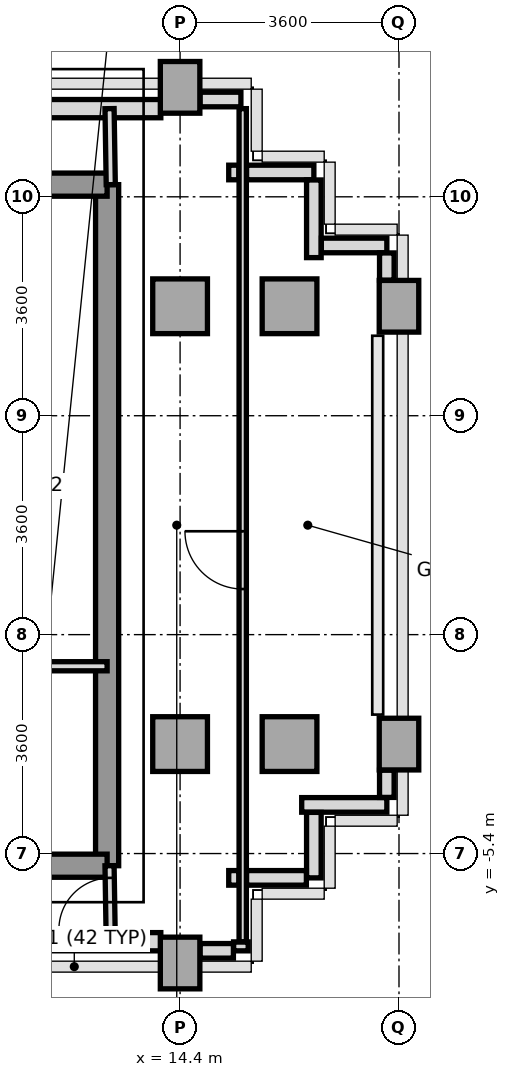
"""IFC4 building model, lengths in metres.
Left out: names, types, materials, properties, quantities, classifications, styles, units other than length and angle.
Written with IfcOpenShell. Run it as: python <this file> out.ifc"""

import sys

from ifc_helpers import new_model, si_unit, direction, frame, frame_2d, origin, origin_2d, place, context, subcontext, project, spatial, rectangle, extrude, source, transform, mapped, element, fill, save


model = new_model("IFC4")
c1 = context("Model", 3, precision=1e-05, world=origin(), true_north=direction((0.0, 1.0)))
c2 = subcontext(c1, "Body", "Model", "MODEL_VIEW")
j1 = project(units=[si_unit("LENGTHUNIT", "METRE"), si_unit("PLANEANGLEUNIT", "RADIAN")], contexts=[c1])
p1 = place(None, origin())
s1 = spatial("IfcSite", under=j1, at=p1, CompositionType="ELEMENT")
p2 = place(p1, origin())
s2 = spatial("IfcBuilding", under=s1, at=p2, CompositionType="ELEMENT")
p3 = place(p2, frame((0.0, 0.0, 160.4)))
s3 = spatial("IfcBuildingStorey", under=s2, at=p3, CompositionType="ELEMENT", Elevation=160.4)
m1 = source(origin(), c2, "Body", "SweptSolid", [
    extrude(rectangle(XDim=0.65, YDim=0.85, at=origin_2d()), origin(), (0.0, 0.0, 1.0), 3.2),
])
p4 = place(p3, frame((14.4, -7.2, 0.0), z_axis=(0.0, 0.0, 1.0), x_axis=(1.0, 0.0, 0.0)))
e1 = element("IfcColumn", 1, at=p4, inside=s3, PredefinedType="COLUMN", context=c2, shape_type="MappedRepresentation", body=[
    mapped(m1, transform((0.0, 0.0, 0.0), x_axis=(1.0, 0.0, 0.0), y_axis=(0.0, 1.0, 0.0), z_axis=(0.0, 0.0, 1.0), scale=1.0)),
])
m2 = source(origin(), c2, "Body", "SweptSolid", [
    extrude(rectangle(XDim=0.9, YDim=0.9, at=origin_2d()), origin(), (0.0, 0.0, 1.0), 3.2),
])
for number, where, z_axis, x_axis in (
    (2, (14.4, -3.6, 0.0), (0.0, 0.0, 1.0), (1.0, 0.0, 0.0)),
    (3, (14.4, 3.6, 0.0), (0.0, 0.0, 1.0), (1.0, 0.0, 0.0)),
):
    element("IfcColumn", number, at=place(p3, frame(where, z_axis=z_axis, x_axis=x_axis)), inside=s3, PredefinedType="COLUMN", context=c2, shape_type="MappedRepresentation", body=[
        mapped(m2, transform((0.0, 0.0, 0.0), x_axis=(1.0, 0.0, 0.0), y_axis=(0.0, 1.0, 0.0), z_axis=(0.0, 0.0, 1.0), scale=1.0)),
    ])
p5 = place(p3, frame((14.4, 7.2, 0.0), z_axis=(0.0, 0.0, 1.0), x_axis=(1.0, 0.0, 0.0)))
e4 = element("IfcColumn", 4, at=p5, inside=s3, PredefinedType="COLUMN", context=c2, shape_type="MappedRepresentation", body=[
    mapped(m1, transform((0.0, 0.0, 0.0), x_axis=(1.0, 0.0, 0.0), y_axis=(0.0, 1.0, 0.0), z_axis=(0.0, 0.0, 1.0), scale=1.0)),
])
for number, where, z_axis, x_axis in (
    (5, (16.2, -3.6, 0.0), (0.0, 0.0, 1.0), (1.0, 0.0, 0.0)),
    (6, (16.2, 3.6, 0.0), (0.0, 0.0, 1.0), (1.0, 0.0, 0.0)),
):
    element("IfcColumn", number, at=place(p3, frame(where, z_axis=z_axis, x_axis=x_axis)), inside=s3, PredefinedType="COLUMN", context=c2, shape_type="MappedRepresentation", body=[
        mapped(m2, transform((0.0, 0.0, 0.0), x_axis=(1.0, 0.0, 0.0), y_axis=(0.0, 1.0, 0.0), z_axis=(0.0, 0.0, 1.0), scale=1.0)),
    ])
for number, where, z_axis, x_axis in (
    (7, (18.0, -3.6, 0.0), (0.0, 0.0, 1.0), (1.0, 0.0, 0.0)),
    (8, (18.0, 3.6, 0.0), (0.0, 0.0, 1.0), (1.0, 0.0, 0.0)),
):
    element("IfcColumn", number, at=place(p3, frame(where, z_axis=z_axis, x_axis=x_axis)), inside=s3, PredefinedType="COLUMN", context=c2, shape_type="MappedRepresentation", body=[
        mapped(m1, transform((0.0, 0.0, 0.0), x_axis=(1.0, 0.0, 0.0), y_axis=(0.0, 1.0, 0.0), z_axis=(0.0, 0.0, 1.0), scale=1.0)),
    ])
p6 = place(p3, frame((11.448, 6.85, 0.0), z_axis=(0.0, 0.0, 1.0), x_axis=(1.0, 0.0, 0.0)))
e9 = element("IfcWall", 9, at=p6, inside=s3, PredefinedType="SOLIDWALL", context=c2, shape_type="SweptSolid", body=[
    extrude(rectangle(XDim=2.635, YDim=0.3, at=frame_2d((1.317, 0.0))), origin(), (0.0, 0.0, 1.0), 3.2),
])
p7 = place(p3, frame((11.75, -6.85, 0.0), z_axis=(0.0, 0.0, 1.0), x_axis=(1.0, 0.0, 0.0)))
e10 = element("IfcWall", 10, at=p7, inside=s3, PredefinedType="SOLIDWALL", context=c2, shape_type="SweptSolid", body=[
    extrude(rectangle(XDim=2.333, YDim=0.3, at=frame_2d((1.167, 0.0))), origin(), (0.0, 0.0, 1.0), 3.2),
])
p8 = place(p3, frame((17.8, -4.6, 0.0), z_axis=(0.0, 0.0, 1.0), x_axis=(-1.0, 0.0, 0.0)))
e11 = element("IfcWall", 11, at=p8, inside=s3, PredefinedType="PARAPET", context=c2, shape_type="SweptSolid", body=[
    extrude(rectangle(XDim=1.4, YDim=0.24, at=frame_2d((0.7, 0.0))), origin(), (0.0, 0.0, 1.0), 1.15),
])
p9 = place(p3, frame((16.6, -4.723, 0.0), z_axis=(0.0, 0.0, 1.0), x_axis=(0.0, -1.0, 0.0)))
e12 = element("IfcWall", 12, at=p9, inside=s3, PredefinedType="PARAPET", context=c2, shape_type="SweptSolid", body=[
    extrude(rectangle(XDim=1.077, YDim=0.24, at=frame_2d((0.539, 0.0))), origin(), (0.0, 0.0, 1.0), 1.15),
])
p10 = place(p3, frame((16.477, -5.8, 0.0), z_axis=(0.0, 0.0, 1.0), x_axis=(-1.0, 0.0, 0.0)))
e13 = element("IfcWall", 13, at=p10, inside=s3, PredefinedType="PARAPET", context=c2, shape_type="SweptSolid", body=[
    extrude(rectangle(XDim=0.984, YDim=0.24, at=frame_2d((0.492, 0.0))), origin(), (0.0, 0.0, 1.0), 1.15),
])
p11 = place(p3, frame((15.367, -5.8, 0.0), z_axis=(0.0, 0.0, 1.0), x_axis=(-1.0, 0.0, 0.0)))
e14 = element("IfcWall", 14, at=p11, inside=s3, PredefinedType="PARAPET", context=c2, shape_type="SweptSolid", body=[
    extrude(rectangle(XDim=0.167, YDim=0.24, at=frame_2d((0.083, 0.0))), origin(), (0.0, 0.0, 1.0), 1.15),
])
p12 = place(p3, frame((15.4, -6.853, 0.0), z_axis=(0.0, 0.0, 1.0), x_axis=(0.0, -1.0, 0.0)))
e15 = element("IfcWall", 15, at=p12, inside=s3, PredefinedType="PARAPET", context=c2, shape_type="SweptSolid", body=[
    extrude(rectangle(XDim=0.147, YDim=0.24, at=frame_2d((0.073, 0.0))), origin(), (0.0, 0.0, 1.0), 1.15),
])
p13 = place(p3, frame((15.277, -7.0, 0.0), z_axis=(0.0, 0.0, 1.0), x_axis=(-1.0, 0.0, 0.0)))
e16 = element("IfcWall", 16, at=p13, inside=s3, PredefinedType="PARAPET", context=c2, shape_type="SweptSolid", body=[
    extrude(rectangle(XDim=0.549, YDim=0.24, at=frame_2d((0.274, 0.0))), origin(), (0.0, 0.0, 1.0), 1.15),
])
p14 = place(p3, frame((14.728, 7.0, 0.0), z_axis=(0.0, 0.0, 1.0), x_axis=(1.0, 0.0, 0.0)))
e17 = element("IfcWall", 17, at=p14, inside=s3, PredefinedType="PARAPET", context=c2, shape_type="SweptSolid", body=[
    extrude(rectangle(XDim=0.672, YDim=0.24, at=frame_2d((0.336, 0.0))), origin(), (0.0, 0.0, 1.0), 1.15),
])
p15 = place(p3, frame((15.2, 5.8, 0.0), z_axis=(0.0, 0.0, 1.0), x_axis=(1.0, 0.0, 0.0)))
e18 = element("IfcWall", 18, at=p15, inside=s3, PredefinedType="PARAPET", context=c2, shape_type="SweptSolid", body=[
    extrude(rectangle(XDim=0.167, YDim=0.24, at=frame_2d((0.083, 0.0))), origin(), (0.0, 0.0, 1.0), 1.15),
])
p16 = place(p3, frame((15.493, 5.8, 0.0), z_axis=(0.0, 0.0, 1.0), x_axis=(1.0, 0.0, 0.0)))
e19 = element("IfcWall", 19, at=p16, inside=s3, PredefinedType="PARAPET", context=c2, shape_type="SweptSolid", body=[
    extrude(rectangle(XDim=1.107, YDim=0.24, at=frame_2d((0.554, 0.0))), origin(), (0.0, 0.0, 1.0), 1.15),
])
p17 = place(p3, frame((16.6, 5.677, 0.0), z_axis=(0.0, 0.0, 1.0), x_axis=(0.0, -1.0, 0.0)))
e20 = element("IfcWall", 20, at=p17, inside=s3, PredefinedType="PARAPET", context=c2, shape_type="SweptSolid", body=[
    extrude(rectangle(XDim=1.277, YDim=0.24, at=frame_2d((0.639, 0.0))), origin(), (0.0, 0.0, 1.0), 1.15),
])
p18 = place(p3, frame((16.723, 4.6, 0.0), z_axis=(0.0, 0.0, 1.0), x_axis=(1.0, 0.0, 0.0)))
e21 = element("IfcWall", 21, at=p18, inside=s3, PredefinedType="PARAPET", context=c2, shape_type="SweptSolid", body=[
    extrude(rectangle(XDim=1.077, YDim=0.24, at=frame_2d((0.539, 0.0))), origin(), (0.0, 0.0, 1.0), 1.15),
])
for number, where, z_axis, x_axis in (
    (22, (17.8, 4.477, 0.0), (0.0, 0.0, 1.0), (0.0, -1.0, 0.0)),
    (23, (17.8, -4.028, 0.0), (0.0, 0.0, 1.0), (0.0, -1.0, 0.0)),
):
    element("IfcWall", number, at=place(p3, frame(where, z_axis=z_axis, x_axis=x_axis)), inside=s3, PredefinedType="PARAPET", context=c2, shape_type="SweptSolid", body=[
        extrude(rectangle(XDim=0.449, YDim=0.24, at=frame_2d((0.225, 0.0))), origin(), (0.0, 0.0, 1.0), 1.15),
    ])
p19 = place(p3, frame((13.2, -5.6, 0.0), z_axis=(0.0, 0.0, 1.0), x_axis=(0.0, 1.0, 0.0)))
e24 = element("IfcWall", 24, at=p19, inside=s3, PredefinedType="SHEAR", context=c2, shape_type="SweptSolid", body=[
    extrude(rectangle(XDim=11.2, YDim=0.38, at=frame_2d((5.6, 0.0))), origin(), (0.0, 0.0, 1.0), 3.2),
])
p20 = place(p3, frame((11.356, 5.6, 0.0), z_axis=(0.0, 0.0, 1.0), x_axis=(1.0, 0.0, 0.0)))
e25 = element("IfcWall", 25, at=p20, inside=s3, PredefinedType="SHEAR", context=c2, shape_type="SweptSolid", body=[
    extrude(rectangle(XDim=1.844, YDim=0.38, at=frame_2d((0.922, 0.0))), origin(), (0.0, 0.0, 1.0), 3.2),
])
p21 = place(p3, frame((5.4, -5.6, 0.0), z_axis=(0.0, 0.0, 1.0), x_axis=(1.0, 0.0, 0.0)))
e26 = element("IfcWall", 26, at=p21, inside=s3, PredefinedType="SHEAR", context=c2, shape_type="SweptSolid", body=[
    extrude(rectangle(XDim=7.8, YDim=0.38, at=frame_2d((3.9, 0.0))), origin(), (0.0, 0.0, 1.0), 3.2),
])
p22 = place(p21, frame((3.0, 0.0, 0.0)))
e27 = element("IfcOpeningElement", 27, at=p22, cuts=e26, PredefinedType="OPENING", context=c2, shape_type="SweptSolid", body=[
    extrude(rectangle(XDim=1.2, YDim=2.2, at=frame_2d((0.6, 1.1))), frame((0.0, 0.2, 0.0), z_axis=(0.0, -1.0, 0.0), x_axis=(1.0, 0.0, 0.0)), (0.0, 0.0, 1.0), 0.4),
])
p23 = place(p21, frame((5.85, 0.0, 0.0)))
e28 = element("IfcOpeningElement", 28, at=p23, cuts=e26, PredefinedType="OPENING", context=c2, shape_type="SweptSolid", body=[
    extrude(rectangle(XDim=0.8, YDim=2.1, at=frame_2d((0.4, 1.05))), frame((0.0, 0.2, 0.0), z_axis=(0.0, -1.0, 0.0), x_axis=(1.0, 0.0, 0.0)), (0.0, 0.0, 1.0), 0.4),
])
p24 = place(p3, frame((11.02, -2.32, 0.0), z_axis=(0.0, 0.0, 1.0), x_axis=(1.0, 0.0, 0.0)))
e29 = element("IfcWall", 29, at=p24, inside=s3, PredefinedType="PARTITIONING", context=c2, shape_type="SweptSolid", body=[
    extrude(rectangle(XDim=2.18, YDim=0.15, at=frame_2d((1.09, 0.0))), origin(), (0.0, 0.0, 1.0), 3.2),
])
p25 = place(p3, frame((13.26, 5.6, 0.0), z_axis=(0.0, 0.0, 1.0), x_axis=(-0.016013571389, 0.999871774545, 0.0)))
e30 = element("IfcWall", 30, at=p25, inside=s3, PredefinedType="PARTITIONING", context=c2, shape_type="SweptSolid", body=[
    extrude(rectangle(XDim=1.25, YDim=0.15, at=frame_2d((0.625, 0.0))), origin(), (0.0, 0.0, 1.0), 3.2),
])
p26 = place(p3, frame((13.26, -6.85, 0.0), z_axis=(0.0, 0.0, 1.0), x_axis=(-0.016013571389, 0.999871774545, 0.0)))
e31 = element("IfcWall", 31, at=p26, inside=s3, PredefinedType="PARTITIONING", context=c2, shape_type="SweptSolid", body=[
    extrude(rectangle(XDim=1.25, YDim=0.15, at=frame_2d((0.625, 0.0))), origin(), (0.0, 0.0, 1.0), 3.2),
])
p27 = place(p26, frame((0.2, 0.0, 0.0)))
e32 = element("IfcOpeningElement", 32, at=p27, cuts=e31, PredefinedType="OPENING", context=c2, shape_type="SweptSolid", body=[
    extrude(rectangle(XDim=0.85, YDim=2.1, at=frame_2d((0.425, 1.05))), frame((0.0, 0.085, 0.0), z_axis=(0.0, -1.0, 0.0), x_axis=(1.0, 0.0, 0.0)), (0.0, 0.0, 1.0), 0.17),
])
p28 = place(p3, frame((15.43, -6.85, 0.0), z_axis=(0.0, 0.0, 1.0), x_axis=(0.0, 1.0, 0.0)))
e33 = element("IfcWall", 33, at=p28, inside=s3, PredefinedType="PARTITIONING", context=c2, shape_type="SweptSolid", body=[
    extrude(rectangle(XDim=13.7, YDim=0.12, at=frame_2d((6.85, 0.0))), origin(), (0.0, 0.0, 1.0), 3.2),
])
p29 = place(p28, frame((5.8, 0.0, 0.0)))
e34 = element("IfcOpeningElement", 34, at=p29, cuts=e33, PredefinedType="OPENING", context=c2, shape_type="SweptSolid", body=[
    extrude(rectangle(XDim=0.95, YDim=2.15, at=frame_2d((0.475, 1.075))), frame((0.0, 0.07, 0.0), z_axis=(0.0, -1.0, 0.0), x_axis=(1.0, 0.0, 0.0)), (0.0, 0.0, 1.0), 0.14),
])
m3 = source(origin(), c2, "Body", "SweptSolid", [
    extrude(rectangle(XDim=0.85, YDim=2.1, at=frame_2d((0.425, 1.05))), frame((0.0, 0.025, 0.0), z_axis=(0.0, -1.0, 0.0), x_axis=(1.0, 0.0, 0.0)), (0.0, 0.0, 1.0), 0.05),
])
p30 = place(p27, origin())
e35 = element("IfcDoor", 35, at=p30, inside=s3, OperationType="SINGLE_SWING_LEFT", PredefinedType="DOOR", context=c2, shape_type="MappedRepresentation", body=[
    mapped(m3, transform((0.0, 0.0, 0.0), x_axis=(1.0, 0.0, 0.0), y_axis=(0.0, 1.0, 0.0), z_axis=(0.0, 0.0, 1.0), scale=1.0)),
])
fill(e32, e35)
m4 = source(origin(), c2, "Body", "SweptSolid", [
    extrude(rectangle(XDim=0.95, YDim=2.15, at=frame_2d((0.475, 1.075))), frame((0.0, 0.025, 0.0), z_axis=(0.0, -1.0, 0.0), x_axis=(1.0, 0.0, 0.0)), (0.0, 0.0, 1.0), 0.05),
])
p31 = place(p29, origin())
e36 = element("IfcDoor", 36, at=p31, inside=s3, OperationType="SINGLE_SWING_RIGHT", PredefinedType="DOOR", context=c2, shape_type="MappedRepresentation", body=[
    mapped(m4, transform((0.0, 0.0, 0.0), x_axis=(1.0, 0.0, 0.0), y_axis=(0.0, 1.0, 0.0), z_axis=(0.0, 0.0, 1.0), scale=1.0)),
])
fill(e34, e36)
save(model, sys.argv[1])
